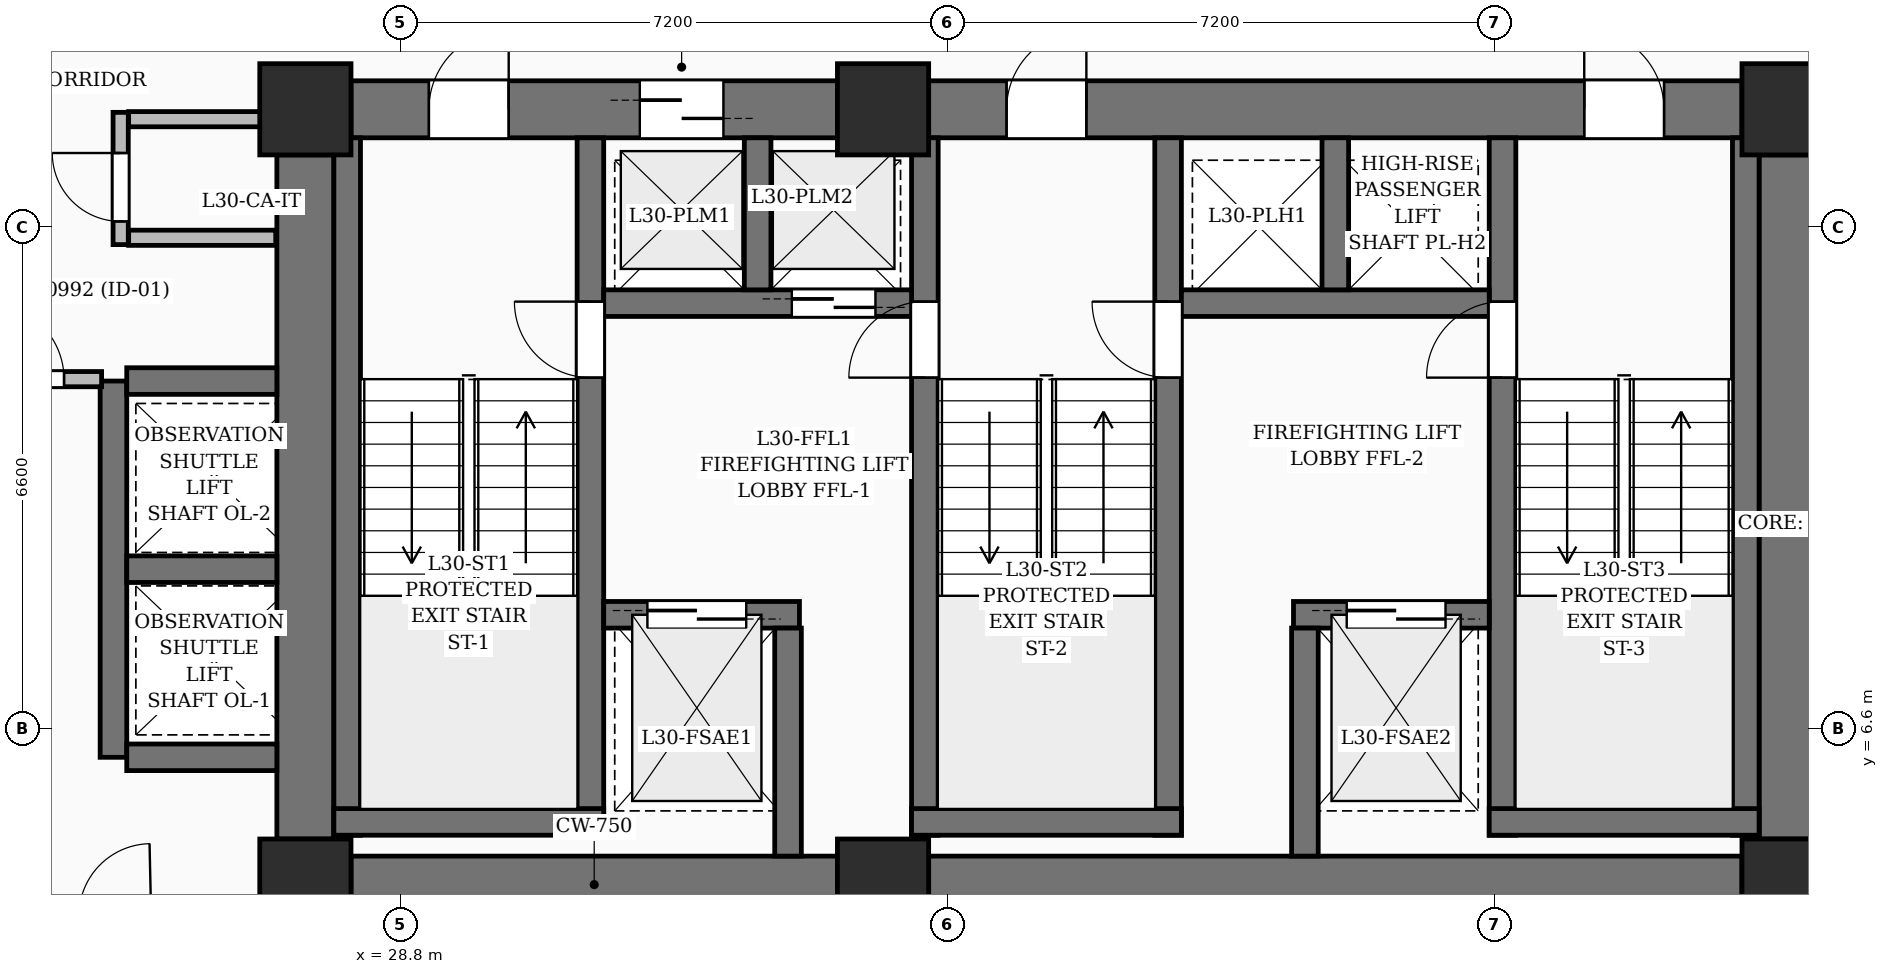
"""IFC4 building model, lengths in metres.
Left out: names, types, materials, properties, quantities, classifications, styles, units other than length and angle.
Written with IfcOpenShell. Run it as: python <this file> out.ifc"""

import sys

from ifc_helpers import new_model, si_unit, direction, frame, frame_2d, origin, origin_2d, place, context, subcontext, project, spatial, rectangle, extrude, element, fill, save


model = new_model("IFC4")
c1 = context("Model", 3, precision=1e-05, world=origin(), true_north=direction((0.0, 1.0)))
c2 = subcontext(c1, "Body", "Model", "MODEL_VIEW")
j1 = project(units=[si_unit("LENGTHUNIT", "METRE"), si_unit("PLANEANGLEUNIT", "RADIAN")], contexts=[c1])
p1 = place(None, origin())
s1 = spatial("IfcSite", under=j1, at=p1, CompositionType="ELEMENT")
p2 = place(p1, origin())
s2 = spatial("IfcBuilding", under=s1, at=p2, CompositionType="ELEMENT")
p3 = place(p2, frame((0.0, 0.0, 121.2)))
s3 = spatial("IfcBuildingStorey", under=s2, at=p3, CompositionType="ELEMENT", Elevation=121.2)
for number, where, z_axis, x_axis in (
    (1, (27.55, 4.55, 0.0), (0.0, 0.0, 1.0), (1.0, 0.0, 0.0)),
    (2, (35.15, 4.55, 0.0), (0.0, 0.0, 1.0), (1.0, 0.0, 0.0)),
    (3, (47.05, 4.55, 0.0), (0.0, 0.0, 1.0), (1.0, 0.0, 0.0)),
    (4, (27.55, 14.75, 0.0), (0.0, 0.0, 1.0), (1.0, 0.0, 0.0)),
    (5, (35.15, 14.75, 0.0), (0.0, 0.0, 1.0), (1.0, 0.0, 0.0)),
    (6, (47.05, 14.75, 0.0), (0.0, 0.0, 1.0), (1.0, 0.0, 0.0)),
):
    element("IfcColumn", number, at=place(p3, frame(where, z_axis=z_axis, x_axis=x_axis)), inside=s3, PredefinedType="COLUMN", context=c2, shape_type="SweptSolid", body=[
        extrude(rectangle(XDim=1.2, YDim=1.2, at=origin_2d()), origin(), (0.0, 0.0, 1.0), 3.6),
    ])
p4 = place(p3, frame((28.15, 4.55, 0.0), z_axis=(0.0, 0.0, 1.0), x_axis=(1.0, 0.0, 0.0)))
e7 = element("IfcWall", 7, at=p4, inside=s3, PredefinedType="SHEAR", context=c2, shape_type="SweptSolid", body=[
    extrude(rectangle(XDim=6.4, YDim=0.75, at=frame_2d((3.2, 0.0))), origin(), (0.0, 0.0, 1.0), 3.6),
])
p5 = place(p3, frame((35.75, 4.55, 0.0), z_axis=(0.0, 0.0, 1.0), x_axis=(1.0, 0.0, 0.0)))
e8 = element("IfcWall", 8, at=p5, inside=s3, PredefinedType="SHEAR", context=c2, shape_type="SweptSolid", body=[
    extrude(rectangle(XDim=10.7, YDim=0.75, at=frame_2d((5.35, 0.0))), origin(), (0.0, 0.0, 1.0), 3.6),
])
p6 = place(p3, frame((28.15, 14.75, 0.0), z_axis=(0.0, 0.0, 1.0), x_axis=(1.0, 0.0, 0.0)))
e9 = element("IfcWall", 9, at=p6, inside=s3, PredefinedType="SHEAR", context=c2, shape_type="SweptSolid", body=[
    extrude(rectangle(XDim=6.4, YDim=0.75, at=frame_2d((3.2, 0.0))), origin(), (0.0, 0.0, 1.0), 3.6),
])
p7 = place(p6, frame((1.025, 0.0, 0.0)))
e10 = element("IfcOpeningElement", 10, at=p7, cuts=e9, PredefinedType="OPENING", context=c2, shape_type="SweptSolid", body=[
    extrude(rectangle(XDim=1.05, YDim=2.15, at=frame_2d((0.525, 1.075))), frame((0.0, 0.385, 0.0), z_axis=(0.0, -1.0, 0.0), x_axis=(1.0, 0.0, 0.0)), (0.0, 0.0, 1.0), 0.77),
])
p8 = place(p6, frame((3.8, 0.0, 0.0)))
e11 = element("IfcOpeningElement", 11, at=p8, cuts=e9, PredefinedType="OPENING", context=c2, shape_type="SweptSolid", body=[
    extrude(rectangle(XDim=1.1, YDim=2.2, at=frame_2d((0.55, 1.1))), frame((0.0, 0.385, 0.0), z_axis=(0.0, -1.0, 0.0), x_axis=(1.0, 0.0, 0.0)), (0.0, 0.0, 1.0), 0.77),
])
p9 = place(p3, frame((35.75, 14.75, 0.0), z_axis=(0.0, 0.0, 1.0), x_axis=(1.0, 0.0, 0.0)))
e12 = element("IfcWall", 12, at=p9, inside=s3, PredefinedType="SHEAR", context=c2, shape_type="SweptSolid", body=[
    extrude(rectangle(XDim=10.7, YDim=0.75, at=frame_2d((5.35, 0.0))), origin(), (0.0, 0.0, 1.0), 3.6),
])
p10 = place(p9, frame((1.025, 0.0, 0.0)))
e13 = element("IfcOpeningElement", 13, at=p10, cuts=e12, PredefinedType="OPENING", context=c2, shape_type="SweptSolid", body=[
    extrude(rectangle(XDim=1.05, YDim=2.15, at=frame_2d((0.525, 1.075))), frame((0.0, 0.385, 0.0), z_axis=(0.0, -1.0, 0.0), x_axis=(1.0, 0.0, 0.0)), (0.0, 0.0, 1.0), 0.77),
])
p11 = place(p9, frame((8.625, 0.0, 0.0)))
e14 = element("IfcOpeningElement", 14, at=p11, cuts=e12, PredefinedType="OPENING", context=c2, shape_type="SweptSolid", body=[
    extrude(rectangle(XDim=1.05, YDim=2.15, at=frame_2d((0.525, 1.075))), frame((0.0, 0.385, 0.0), z_axis=(0.0, -1.0, 0.0), x_axis=(1.0, 0.0, 0.0)), (0.0, 0.0, 1.0), 0.77),
])
for number, where, z_axis, x_axis in (
    (15, (27.55, 5.15, 0.0), (0.0, 0.0, 1.0), (0.0, 1.0, 0.0)),
    (16, (47.05, 5.15, 0.0), (0.0, 0.0, 1.0), (0.0, 1.0, 0.0)),
):
    element("IfcWall", number, at=place(p3, frame(where, z_axis=z_axis, x_axis=x_axis)), inside=s3, PredefinedType="SHEAR", context=c2, shape_type="SweptSolid", body=[
        extrude(rectangle(XDim=9.0, YDim=0.75, at=frame_2d((4.5, 0.0))), origin(), (0.0, 0.0, 1.0), 3.6),
    ])
p12 = place(p3, frame((28.1, 5.2, 0.0), z_axis=(0.0, 0.0, 1.0), x_axis=(0.0, 1.0, 0.0)))
e17 = element("IfcWall", 17, at=p12, inside=s3, PredefinedType="SOLIDWALL", context=c2, shape_type="SweptSolid", body=[
    extrude(rectangle(XDim=9.175, YDim=0.35, at=frame_2d((4.587, 0.0))), origin(), (0.0, 0.0, 1.0), 3.6),
])
p13 = place(p3, frame((31.3, 5.2, 0.0), z_axis=(0.0, 0.0, 1.0), x_axis=(0.0, 1.0, 0.0)))
e18 = element("IfcWall", 18, at=p13, inside=s3, PredefinedType="SOLIDWALL", context=c2, shape_type="SweptSolid", body=[
    extrude(rectangle(XDim=9.175, YDim=0.35, at=frame_2d((4.587, 0.0))), origin(), (0.0, 0.0, 1.0), 3.6),
])
p14 = place(p13, frame((6.02, 0.0, 0.0)))
e19 = element("IfcOpeningElement", 19, at=p14, cuts=e18, PredefinedType="OPENING", context=c2, shape_type="SweptSolid", body=[
    extrude(rectangle(XDim=1.0, YDim=2.15, at=frame_2d((0.5, 1.075))), frame((0.0, 0.185, 0.0), z_axis=(0.0, -1.0, 0.0), x_axis=(1.0, 0.0, 0.0)), (0.0, 0.0, 1.0), 0.37),
])
p15 = place(p3, frame((27.925, 5.375, 0.0), z_axis=(0.0, 0.0, 1.0), x_axis=(1.0, 0.0, 0.0)))
e20 = element("IfcWall", 20, at=p15, inside=s3, PredefinedType="SOLIDWALL", context=c2, shape_type="SweptSolid", body=[
    extrude(rectangle(XDim=3.55, YDim=0.35, at=frame_2d((1.775, 0.0))), origin(), (0.0, 0.0, 1.0), 3.6),
])
p16 = place(p3, frame((35.7, 5.2, 0.0), z_axis=(0.0, 0.0, 1.0), x_axis=(0.0, 1.0, 0.0)))
e21 = element("IfcWall", 21, at=p16, inside=s3, PredefinedType="SOLIDWALL", context=c2, shape_type="SweptSolid", body=[
    extrude(rectangle(XDim=9.175, YDim=0.35, at=frame_2d((4.587, 0.0))), origin(), (0.0, 0.0, 1.0), 3.6),
])
p17 = place(p16, frame((6.02, 0.0, 0.0)))
e22 = element("IfcOpeningElement", 22, at=p17, cuts=e21, PredefinedType="OPENING", context=c2, shape_type="SweptSolid", body=[
    extrude(rectangle(XDim=1.0, YDim=2.15, at=frame_2d((0.5, 1.075))), frame((0.0, 0.185, 0.0), z_axis=(0.0, -1.0, 0.0), x_axis=(1.0, 0.0, 0.0)), (0.0, 0.0, 1.0), 0.37),
])
p18 = place(p3, frame((38.9, 5.2, 0.0), z_axis=(0.0, 0.0, 1.0), x_axis=(0.0, 1.0, 0.0)))
e23 = element("IfcWall", 23, at=p18, inside=s3, PredefinedType="SOLIDWALL", context=c2, shape_type="SweptSolid", body=[
    extrude(rectangle(XDim=9.175, YDim=0.35, at=frame_2d((4.587, 0.0))), origin(), (0.0, 0.0, 1.0), 3.6),
])
p19 = place(p18, frame((6.02, 0.0, 0.0)))
e24 = element("IfcOpeningElement", 24, at=p19, cuts=e23, PredefinedType="OPENING", context=c2, shape_type="SweptSolid", body=[
    extrude(rectangle(XDim=1.0, YDim=2.15, at=frame_2d((0.5, 1.075))), frame((0.0, 0.185, 0.0), z_axis=(0.0, -1.0, 0.0), x_axis=(1.0, 0.0, 0.0)), (0.0, 0.0, 1.0), 0.37),
])
p20 = place(p3, frame((35.525, 5.375, 0.0), z_axis=(0.0, 0.0, 1.0), x_axis=(1.0, 0.0, 0.0)))
e25 = element("IfcWall", 25, at=p20, inside=s3, PredefinedType="SOLIDWALL", context=c2, shape_type="SweptSolid", body=[
    extrude(rectangle(XDim=3.55, YDim=0.35, at=frame_2d((1.775, 0.0))), origin(), (0.0, 0.0, 1.0), 3.6),
])
p21 = place(p3, frame((43.3, 5.2, 0.0), z_axis=(0.0, 0.0, 1.0), x_axis=(0.0, 1.0, 0.0)))
e26 = element("IfcWall", 26, at=p21, inside=s3, PredefinedType="SOLIDWALL", context=c2, shape_type="SweptSolid", body=[
    extrude(rectangle(XDim=9.175, YDim=0.35, at=frame_2d((4.587, 0.0))), origin(), (0.0, 0.0, 1.0), 3.6),
])
p22 = place(p21, frame((6.02, 0.0, 0.0)))
e27 = element("IfcOpeningElement", 27, at=p22, cuts=e26, PredefinedType="OPENING", context=c2, shape_type="SweptSolid", body=[
    extrude(rectangle(XDim=1.0, YDim=2.15, at=frame_2d((0.5, 1.075))), frame((0.0, 0.185, 0.0), z_axis=(0.0, -1.0, 0.0), x_axis=(1.0, 0.0, 0.0)), (0.0, 0.0, 1.0), 0.37),
])
p23 = place(p3, frame((46.5, 5.2, 0.0), z_axis=(0.0, 0.0, 1.0), x_axis=(0.0, 1.0, 0.0)))
e28 = element("IfcWall", 28, at=p23, inside=s3, PredefinedType="SOLIDWALL", context=c2, shape_type="SweptSolid", body=[
    extrude(rectangle(XDim=9.175, YDim=0.35, at=frame_2d((4.587, 0.0))), origin(), (0.0, 0.0, 1.0), 3.6),
])
p24 = place(p3, frame((43.125, 5.375, 0.0), z_axis=(0.0, 0.0, 1.0), x_axis=(1.0, 0.0, 0.0)))
e29 = element("IfcWall", 29, at=p24, inside=s3, PredefinedType="SOLIDWALL", context=c2, shape_type="SweptSolid", body=[
    extrude(rectangle(XDim=3.55, YDim=0.35, at=frame_2d((1.775, 0.0))), origin(), (0.0, 0.0, 1.0), 3.6),
])
p25 = place(p3, frame((31.475, 8.1, 0.0), z_axis=(0.0, 0.0, 1.0), x_axis=(1.0, 0.0, 0.0)))
e30 = element("IfcWall", 30, at=p25, inside=s3, PredefinedType="SOLIDWALL", context=c2, shape_type="SweptSolid", body=[
    extrude(rectangle(XDim=2.575, YDim=0.35, at=frame_2d((1.288, 0.0))), origin(), (0.0, 0.0, 1.0), 3.6),
])
p26 = place(p25, frame((0.575, 0.0, 0.0)))
e31 = element("IfcOpeningElement", 31, at=p26, cuts=e30, PredefinedType="OPENING", context=c2, shape_type="SweptSolid", body=[
    extrude(rectangle(XDim=1.3, YDim=2.25, at=frame_2d((0.65, 1.125))), frame((0.0, 0.185, 0.0), z_axis=(0.0, -1.0, 0.0), x_axis=(1.0, 0.0, 0.0)), (0.0, 0.0, 1.0), 0.37),
])
p27 = place(p3, frame((40.55, 8.1, 0.0), z_axis=(0.0, 0.0, 1.0), x_axis=(1.0, 0.0, 0.0)))
e32 = element("IfcWall", 32, at=p27, inside=s3, PredefinedType="SOLIDWALL", context=c2, shape_type="SweptSolid", body=[
    extrude(rectangle(XDim=2.575, YDim=0.35, at=frame_2d((1.288, 0.0))), origin(), (0.0, 0.0, 1.0), 3.6),
])
p28 = place(p27, frame((0.7, 0.0, 0.0)))
e33 = element("IfcOpeningElement", 33, at=p28, cuts=e32, PredefinedType="OPENING", context=c2, shape_type="SweptSolid", body=[
    extrude(rectangle(XDim=1.3, YDim=2.25, at=frame_2d((0.65, 1.125))), frame((0.0, 0.185, 0.0), z_axis=(0.0, -1.0, 0.0), x_axis=(1.0, 0.0, 0.0)), (0.0, 0.0, 1.0), 0.37),
])
for number, where, z_axis, x_axis in (
    (34, (33.9, 4.925, 0.0), (0.0, 0.0, 1.0), (0.0, 1.0, 0.0)),
    (35, (40.7, 4.925, 0.0), (0.0, 0.0, 1.0), (0.0, 1.0, 0.0)),
):
    element("IfcWall", number, at=place(p3, frame(where, z_axis=z_axis, x_axis=x_axis)), inside=s3, PredefinedType="SOLIDWALL", context=c2, shape_type="SweptSolid", body=[
        extrude(rectangle(XDim=3.0, YDim=0.35, at=frame_2d((1.5, 0.0))), origin(), (0.0, 0.0, 1.0), 3.6),
    ])
p29 = place(p3, frame((31.475, 12.2, 0.0), z_axis=(0.0, 0.0, 1.0), x_axis=(1.0, 0.0, 0.0)))
e36 = element("IfcWall", 36, at=p29, inside=s3, PredefinedType="SOLIDWALL", context=c2, shape_type="SweptSolid", body=[
    extrude(rectangle(XDim=4.05, YDim=0.35, at=frame_2d((2.025, 0.0))), origin(), (0.0, 0.0, 1.0), 3.6),
])
p30 = place(p29, frame((2.475, 0.0, 0.0)))
e37 = element("IfcOpeningElement", 37, at=p30, cuts=e36, PredefinedType="OPENING", context=c2, shape_type="SweptSolid", body=[
    extrude(rectangle(XDim=1.1, YDim=2.2, at=frame_2d((0.55, 1.1))), frame((0.0, 0.185, 0.0), z_axis=(0.0, -1.0, 0.0), x_axis=(1.0, 0.0, 0.0)), (0.0, 0.0, 1.0), 0.37),
])
p31 = place(p3, frame((33.5, 12.375, 0.0), z_axis=(0.0, 0.0, 1.0), x_axis=(0.0, 1.0, 0.0)))
e38 = element("IfcWall", 38, at=p31, inside=s3, PredefinedType="SOLIDWALL", context=c2, shape_type="SweptSolid", body=[
    extrude(rectangle(XDim=2.0, YDim=0.35, at=frame_2d((1.0, 0.0))), origin(), (0.0, 0.0, 1.0), 3.6),
])
p32 = place(p3, frame((39.075, 12.2, 0.0), z_axis=(0.0, 0.0, 1.0), x_axis=(1.0, 0.0, 0.0)))
e39 = element("IfcWall", 39, at=p32, inside=s3, PredefinedType="SOLIDWALL", context=c2, shape_type="SweptSolid", body=[
    extrude(rectangle(XDim=4.05, YDim=0.35, at=frame_2d((2.025, 0.0))), origin(), (0.0, 0.0, 1.0), 3.6),
])
p33 = place(p3, frame((41.1, 12.375, 0.0), z_axis=(0.0, 0.0, 1.0), x_axis=(0.0, 1.0, 0.0)))
e40 = element("IfcWall", 40, at=p33, inside=s3, PredefinedType="SOLIDWALL", context=c2, shape_type="SweptSolid", body=[
    extrude(rectangle(XDim=2.0, YDim=0.35, at=frame_2d((1.0, 0.0))), origin(), (0.0, 0.0, 1.0), 3.6),
])
p34 = place(p3, frame((25.025, 6.225, 0.0), z_axis=(0.0, 0.0, 1.0), x_axis=(0.0, 1.0, 0.0)))
e41 = element("IfcWall", 41, at=p34, inside=s3, PredefinedType="SOLIDWALL", context=c2, shape_type="SweptSolid", body=[
    extrude(rectangle(XDim=4.95, YDim=0.35, at=frame_2d((2.475, 0.0))), origin(), (0.0, 0.0, 1.0), 3.6),
])
for number, where, z_axis, x_axis in (
    (42, (25.2, 6.225, 0.0), (0.0, 0.0, 1.0), (1.0, 0.0, 0.0)),
    (43, (25.2, 8.7, 0.0), (0.0, 0.0, 1.0), (1.0, 0.0, 0.0)),
    (44, (25.2, 11.175, 0.0), (0.0, 0.0, 1.0), (1.0, 0.0, 0.0)),
):
    element("IfcWall", number, at=place(p3, frame(where, z_axis=z_axis, x_axis=x_axis)), inside=s3, PredefinedType="SOLIDWALL", context=c2, shape_type="SweptSolid", body=[
        extrude(rectangle(XDim=1.975, YDim=0.35, at=frame_2d((0.988, 0.0))), origin(), (0.0, 0.0, 1.0), 3.6),
    ])
p35 = place(p3, frame((25.12, 12.97, 0.0), z_axis=(0.0, 0.0, 1.0), x_axis=(0.0, 1.0, 0.0)))
e45 = element("IfcWall", 45, at=p35, inside=s3, PredefinedType="PARTITIONING", context=c2, shape_type="SweptSolid", body=[
    extrude(rectangle(XDim=1.74, YDim=0.2, at=frame_2d((0.87, 0.0))), origin(), (0.0, 0.0, 1.0), 3.35),
])
p36 = place(p35, frame((0.305, 0.0, 0.0)))
e46 = element("IfcOpeningElement", 46, at=p36, cuts=e45, PredefinedType="OPENING", context=c2, shape_type="SweptSolid", body=[
    extrude(rectangle(XDim=0.9, YDim=2.1, at=frame_2d((0.45, 1.05))), frame((0.0, 0.11, 0.0), z_axis=(0.0, -1.0, 0.0), x_axis=(1.0, 0.0, 0.0)), (0.0, 0.0, 1.0), 0.22),
])
for number, where, z_axis, x_axis in (
    (47, (25.225, 14.62, 0.0), (0.0, 0.0, 1.0), (1.0, 0.0, 0.0)),
    (48, (25.225, 13.06, 0.0), (0.0, 0.0, 1.0), (1.0, 0.0, 0.0)),
):
    element("IfcWall", number, at=place(p3, frame(where, z_axis=z_axis, x_axis=x_axis)), inside=s3, PredefinedType="PARTITIONING", context=c2, shape_type="SweptSolid", body=[
        extrude(rectangle(XDim=1.935, YDim=0.2, at=frame_2d((0.967, 0.0))), origin(), (0.0, 0.0, 1.0), 3.35),
    ])
p37 = place(p3, frame((22.8, 11.2, 0.0), z_axis=(0.0, 0.0, 1.0), x_axis=(1.0, 0.0, 0.0)))
e49 = element("IfcWall", 49, at=p37, inside=s3, PredefinedType="PARTITIONING", context=c2, shape_type="SweptSolid", body=[
    extrude(rectangle(XDim=2.069, YDim=0.2, at=frame_2d((1.035, 0.0))), origin(), (0.0, 0.0, 1.0), 3.35),
])
p38 = place(p37, frame((0.575, 0.0, 0.0)))
e50 = element("IfcOpeningElement", 50, at=p38, cuts=e49, PredefinedType="OPENING", context=c2, shape_type="SweptSolid", body=[
    extrude(rectangle(XDim=1.0, YDim=2.2, at=frame_2d((0.5, 1.1))), frame((0.0, 0.11, 0.0), z_axis=(0.0, -1.0, 0.0), x_axis=(1.0, 0.0, 0.0)), (0.0, 0.0, 1.0), 0.22),
])
p39 = place(p7, origin())
e51 = element("IfcDoor", 51, at=p39, inside=s3, OperationType="SINGLE_SWING_RIGHT", PredefinedType="DOOR", context=c2, shape_type="SweptSolid", body=[
    extrude(rectangle(XDim=1.05, YDim=2.15, at=frame_2d((0.525, 1.075))), frame((0.0, 0.025, 0.0), z_axis=(0.0, -1.0, 0.0), x_axis=(1.0, 0.0, 0.0)), (0.0, 0.0, 1.0), 0.05),
])
fill(e10, e51)
p40 = place(p10, origin())
e52 = element("IfcDoor", 52, at=p40, inside=s3, OperationType="SINGLE_SWING_RIGHT", PredefinedType="DOOR", context=c2, shape_type="SweptSolid", body=[
    extrude(rectangle(XDim=1.05, YDim=2.15, at=frame_2d((0.525, 1.075))), frame((0.0, 0.025, 0.0), z_axis=(0.0, -1.0, 0.0), x_axis=(1.0, 0.0, 0.0)), (0.0, 0.0, 1.0), 0.05),
])
fill(e13, e52)
p41 = place(p11, origin())
e53 = element("IfcDoor", 53, at=p41, inside=s3, OperationType="SINGLE_SWING_LEFT", PredefinedType="DOOR", context=c2, shape_type="SweptSolid", body=[
    extrude(rectangle(XDim=1.05, YDim=2.15, at=frame_2d((0.525, 1.075))), frame((0.0, 0.025, 0.0), z_axis=(0.0, -1.0, 0.0), x_axis=(1.0, 0.0, 0.0)), (0.0, 0.0, 1.0), 0.05),
])
fill(e14, e53)
p42 = place(p14, origin())
e54 = element("IfcDoor", 54, at=p42, inside=s3, OperationType="SINGLE_SWING_RIGHT", PredefinedType="DOOR", context=c2, shape_type="SweptSolid", body=[
    extrude(rectangle(XDim=1.0, YDim=2.15, at=frame_2d((0.5, 1.075))), frame((0.0, 0.025, 0.0), z_axis=(0.0, -1.0, 0.0), x_axis=(1.0, 0.0, 0.0)), (0.0, 0.0, 1.0), 0.05),
])
fill(e19, e54)
p43 = place(p17, origin())
e55 = element("IfcDoor", 55, at=p43, inside=s3, OperationType="SINGLE_SWING_LEFT", PredefinedType="DOOR", context=c2, shape_type="SweptSolid", body=[
    extrude(rectangle(XDim=1.0, YDim=2.15, at=frame_2d((0.5, 1.075))), frame((0.0, 0.025, 0.0), z_axis=(0.0, -1.0, 0.0), x_axis=(1.0, 0.0, 0.0)), (0.0, 0.0, 1.0), 0.05),
])
fill(e22, e55)
p44 = place(p19, origin())
e56 = element("IfcDoor", 56, at=p44, inside=s3, OperationType="SINGLE_SWING_RIGHT", PredefinedType="DOOR", context=c2, shape_type="SweptSolid", body=[
    extrude(rectangle(XDim=1.0, YDim=2.15, at=frame_2d((0.5, 1.075))), frame((0.0, 0.025, 0.0), z_axis=(0.0, -1.0, 0.0), x_axis=(1.0, 0.0, 0.0)), (0.0, 0.0, 1.0), 0.05),
])
fill(e24, e56)
p45 = place(p22, origin())
e57 = element("IfcDoor", 57, at=p45, inside=s3, OperationType="SINGLE_SWING_LEFT", PredefinedType="DOOR", context=c2, shape_type="SweptSolid", body=[
    extrude(rectangle(XDim=1.0, YDim=2.15, at=frame_2d((0.5, 1.075))), frame((0.0, 0.025, 0.0), z_axis=(0.0, -1.0, 0.0), x_axis=(1.0, 0.0, 0.0)), (0.0, 0.0, 1.0), 0.05),
])
fill(e27, e57)
p46 = place(p26, origin())
e58 = element("IfcDoor", 58, at=p46, inside=s3, OperationType="DOUBLE_DOOR_SLIDING", PredefinedType="DOOR", context=c2, shape_type="SweptSolid", body=[
    extrude(rectangle(XDim=1.3, YDim=2.25, at=frame_2d((0.65, 1.125))), frame((0.0, 0.025, 0.0), z_axis=(0.0, -1.0, 0.0), x_axis=(1.0, 0.0, 0.0)), (0.0, 0.0, 1.0), 0.05),
])
fill(e31, e58)
p47 = place(p28, origin())
e59 = element("IfcDoor", 59, at=p47, inside=s3, OperationType="DOUBLE_DOOR_SLIDING", PredefinedType="DOOR", context=c2, shape_type="SweptSolid", body=[
    extrude(rectangle(XDim=1.3, YDim=2.25, at=frame_2d((0.65, 1.125))), frame((0.0, 0.025, 0.0), z_axis=(0.0, -1.0, 0.0), x_axis=(1.0, 0.0, 0.0)), (0.0, 0.0, 1.0), 0.05),
])
fill(e33, e59)
p48 = place(p8, origin())
e60 = element("IfcDoor", 60, at=p48, inside=s3, OperationType="DOUBLE_DOOR_SLIDING", PredefinedType="DOOR", context=c2, shape_type="SweptSolid", body=[
    extrude(rectangle(XDim=1.1, YDim=2.2, at=frame_2d((0.55, 1.1))), frame((0.0, 0.025, 0.0), z_axis=(0.0, -1.0, 0.0), x_axis=(1.0, 0.0, 0.0)), (0.0, 0.0, 1.0), 0.05),
])
fill(e11, e60)
p49 = place(p30, origin())
e61 = element("IfcDoor", 61, at=p49, inside=s3, OperationType="DOUBLE_DOOR_SLIDING", PredefinedType="DOOR", context=c2, shape_type="SweptSolid", body=[
    extrude(rectangle(XDim=1.1, YDim=2.2, at=frame_2d((0.55, 1.1))), frame((0.0, 0.025, 0.0), z_axis=(0.0, -1.0, 0.0), x_axis=(1.0, 0.0, 0.0)), (0.0, 0.0, 1.0), 0.05),
])
fill(e37, e61)
p50 = place(p36, origin())
e62 = element("IfcDoor", 62, at=p50, inside=s3, OperationType="SINGLE_SWING_RIGHT", PredefinedType="DOOR", context=c2, shape_type="SweptSolid", body=[
    extrude(rectangle(XDim=0.9, YDim=2.1, at=frame_2d((0.45, 1.05))), frame((0.0, 0.025, 0.0), z_axis=(0.0, -1.0, 0.0), x_axis=(1.0, 0.0, 0.0)), (0.0, 0.0, 1.0), 0.05),
])
fill(e46, e62)
p51 = place(p38, origin())
e63 = element("IfcDoor", 63, at=p51, inside=s3, OperationType="SINGLE_SWING_LEFT", PredefinedType="DOOR", context=c2, shape_type="SweptSolid", body=[
    extrude(rectangle(XDim=1.0, YDim=2.2, at=frame_2d((0.5, 1.1))), frame((0.0, 0.025, 0.0), z_axis=(0.0, -1.0, 0.0), x_axis=(1.0, 0.0, 0.0)), (0.0, 0.0, 1.0), 0.05),
])
fill(e50, e63)
save(model, sys.argv[1])
